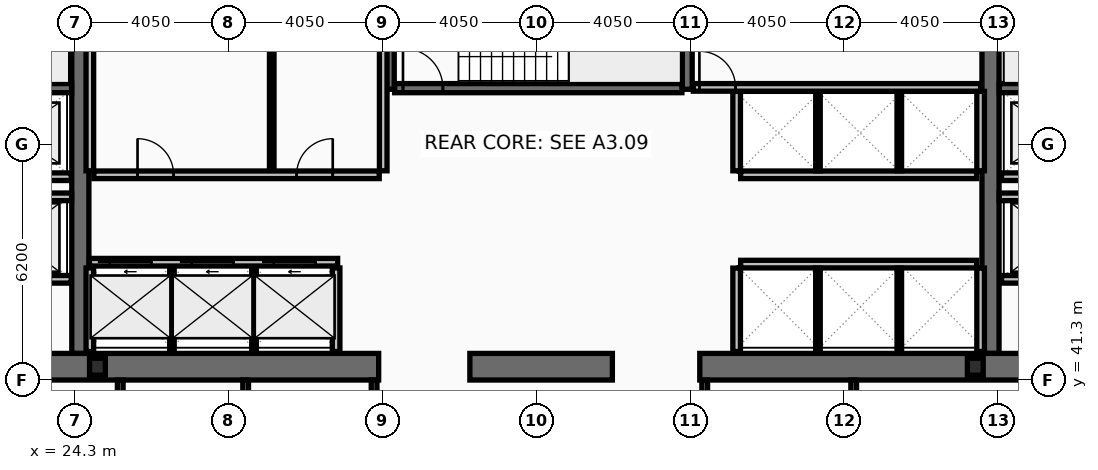
"""IFC4 building model, lengths in metres.
Left out: names, types, materials, properties, quantities, classifications, styles, units other than length and angle.
Written with IfcOpenShell. Run it as: python <this file> out.ifc"""

import sys

from ifc_helpers import new_model, si_unit, direction, frame, frame_2d, origin, origin_2d, place, context, subcontext, project, spatial, rectangle, i_section, extrude, element, fill, save


model = new_model("IFC4")
c1 = context("Model", 3, precision=1e-05, world=origin(), true_north=direction((0.0, 1.0)))
c2 = subcontext(c1, "Body", "Model", "MODEL_VIEW")
j1 = project(units=[si_unit("LENGTHUNIT", "METRE"), si_unit("PLANEANGLEUNIT", "RADIAN")], contexts=[c1])
p1 = place(None, origin())
s1 = spatial("IfcSite", under=j1, at=p1, CompositionType="ELEMENT")
p2 = place(p1, origin())
s2 = spatial("IfcBuilding", under=s1, at=p2, CompositionType="ELEMENT")
p3 = place(p2, frame((0.0, 0.0, 150.6)))
s3 = spatial("IfcBuildingStorey", under=s2, at=p3, CompositionType="ELEMENT", Elevation=150.6)
for number, where, z_axis, x_axis in (
    (1, (24.45, 42.0, 0.0), (0.0, 0.0, 1.0), (0.0, 1.0, 0.0)),
    (2, (48.4, 42.0, 0.0), (0.0, 0.0, 1.0), (0.0, 1.0, 0.0)),
):
    element("IfcWall", number, at=place(p3, frame(where, z_axis=z_axis, x_axis=x_axis)), inside=s3, PredefinedType="SHEAR", context=c2, shape_type="SweptSolid", body=[
        extrude(rectangle(XDim=11.0, YDim=0.45, at=frame_2d((5.5, 0.0))), origin(), (0.0, 0.0, 1.0), 3.44),
    ])
p4 = place(p3, frame((32.3, 41.65, 0.0), z_axis=(0.0, 0.0, 1.0), x_axis=(-1.0, 0.0, 0.0)))
e3 = element("IfcWall", 3, at=p4, inside=s3, PredefinedType="SHEAR", context=c2, shape_type="SweptSolid", body=[
    extrude(rectangle(XDim=11.45, YDim=0.7, at=frame_2d((5.725, 0.0))), origin(), (0.0, 0.0, 1.0), 3.44),
])
p5 = place(p3, frame((38.45, 41.65, 0.0), z_axis=(0.0, 0.0, 1.0), x_axis=(-1.0, 0.0, 0.0)))
e4 = element("IfcWall", 4, at=p5, inside=s3, PredefinedType="SHEAR", context=c2, shape_type="SweptSolid", body=[
    extrude(rectangle(XDim=3.75, YDim=0.7, at=frame_2d((1.875, 0.0))), origin(), (0.0, 0.0, 1.0), 3.44),
])
p6 = place(p3, frame((52.05, 41.65, 0.0), z_axis=(0.0, 0.0, 1.0), x_axis=(-1.0, 0.0, 0.0)))
e5 = element("IfcWall", 5, at=p6, inside=s3, PredefinedType="SHEAR", context=c2, shape_type="SweptSolid", body=[
    extrude(rectangle(XDim=11.3, YDim=0.7, at=frame_2d((5.65, 0.0))), origin(), (0.0, 0.0, 1.0), 3.44),
])
for number, where, z_axis, x_axis in (
    (6, (32.58, 48.95, 0.0), (0.0, 0.0, 1.0), (0.0, 1.0, 0.0)),
    (7, (40.42, 48.95, 0.0), (0.0, 0.0, 1.0), (0.0, 1.0, 0.0)),
):
    element("IfcWall", number, at=place(p3, frame(where, z_axis=z_axis, x_axis=x_axis)), inside=s3, PredefinedType="SHEAR", context=c2, shape_type="SweptSolid", body=[
        extrude(rectangle(XDim=4.05, YDim=0.26, at=frame_2d((2.025, 0.0))), origin(), (0.0, 0.0, 1.0), 3.44),
    ])
p7 = place(p3, frame((16.9, 48.98, 0.0), z_axis=(0.0, 0.0, 1.0), x_axis=(1.0, 0.0, 0.0)))
e8 = element("IfcWall", 8, at=p7, inside=s3, PredefinedType="SHEAR", context=c2, shape_type="SweptSolid", body=[
    extrude(rectangle(XDim=7.32, YDim=0.24, at=frame_2d((3.66, 0.0))), origin(), (0.0, 0.0, 1.0), 3.44),
])
p8 = place(p7, frame((0.22, 0.0, 0.0)))
e9 = element("IfcOpeningElement", 9, at=p8, cuts=e8, PredefinedType="OPENING", context=c2, shape_type="SweptSolid", body=[
    extrude(rectangle(XDim=1.05, YDim=2.15, at=frame_2d((0.525, 1.075))), frame((0.0, 0.13, 0.0), z_axis=(0.0, -1.0, 0.0), x_axis=(1.0, 0.0, 0.0)), (0.0, 0.0, 1.0), 0.26),
])
p9 = place(p3, frame((48.63, 48.98, 0.0), z_axis=(0.0, 0.0, 1.0), x_axis=(1.0, 0.0, 0.0)))
e10 = element("IfcWall", 10, at=p9, inside=s3, PredefinedType="SHEAR", context=c2, shape_type="SweptSolid", body=[
    extrude(rectangle(XDim=7.37, YDim=0.24, at=frame_2d((3.685, 0.0))), origin(), (0.0, 0.0, 1.0), 3.44),
])
p10 = place(p9, frame((6.1, 0.0, 0.0)))
e11 = element("IfcOpeningElement", 11, at=p10, cuts=e10, PredefinedType="OPENING", context=c2, shape_type="SweptSolid", body=[
    extrude(rectangle(XDim=1.05, YDim=2.15, at=frame_2d((0.525, 1.075))), frame((0.0, 0.13, 0.0), z_axis=(0.0, -1.0, 0.0), x_axis=(1.0, 0.0, 0.0)), (0.0, 0.0, 1.0), 0.26),
])
p11 = place(p3, frame((32.72, 48.98, 0.0), z_axis=(0.0, 0.0, 1.0), x_axis=(1.0, 0.0, 0.0)))
e12 = element("IfcWall", 12, at=p11, inside=s3, PredefinedType="SHEAR", context=c2, shape_type="SweptSolid", body=[
    extrude(rectangle(XDim=7.56, YDim=0.24, at=frame_2d((3.78, 0.0))), origin(), (0.0, 0.0, 1.0), 3.44),
])
p12 = place(p11, frame((0.22, 0.0, 0.0)))
e13 = element("IfcOpeningElement", 13, at=p12, cuts=e12, PredefinedType="OPENING", context=c2, shape_type="SweptSolid", body=[
    extrude(rectangle(XDim=1.05, YDim=2.15, at=frame_2d((0.525, 1.075))), frame((0.0, 0.13, 0.0), z_axis=(0.0, -1.0, 0.0), x_axis=(1.0, 0.0, 0.0)), (0.0, 0.0, 1.0), 0.26),
])
for number, where, z_axis, x_axis in (
    (14, (24.9, 41.65, 0.0), (0.0, 0.0, 1.0), (1.0, 0.0, 0.0)),
    (15, (48.0, 41.65, 0.0), (0.0, 0.0, 1.0), (1.0, 0.0, 0.0)),
):
    element("IfcColumn", number, at=place(p3, frame(where, z_axis=z_axis, x_axis=x_axis)), inside=s3, PredefinedType="COLUMN", context=c2, shape_type="SweptSolid", body=[
        extrude(i_section(OverallWidth=0.416, OverallDepth=0.446, WebThickness=0.039, FlangeThickness=0.063, at=origin_2d()), origin(), (0.0, 0.0, 1.0), 3.6),
    ])
p13 = place(p3, frame((24.69, 44.4, 0.0), z_axis=(0.0, 0.0, 1.0), x_axis=(1.0, 0.0, 0.0)))
e16 = element("IfcWall", 16, at=p13, inside=s3, PredefinedType="PARTITIONING", context=c2, shape_type="SweptSolid", body=[
    extrude(rectangle(XDim=6.53, YDim=0.2, at=frame_2d((3.265, 0.0))), origin(), (0.0, 0.0, 1.0), 3.44),
])
p14 = place(p13, frame((0.53, 0.0, 0.0)))
e17 = element("IfcOpeningElement", 17, at=p14, cuts=e16, PredefinedType="OPENING", context=c2, shape_type="SweptSolid", body=[
    extrude(rectangle(XDim=1.1, YDim=2.18, at=frame_2d((0.55, 1.09))), frame((0.0, 0.11, 0.0), z_axis=(0.0, -1.0, 0.0), x_axis=(1.0, 0.0, 0.0)), (0.0, 0.0, 1.0), 0.22),
])
p15 = place(p13, frame((2.69, 0.0, 0.0)))
e18 = element("IfcOpeningElement", 18, at=p15, cuts=e16, PredefinedType="OPENING", context=c2, shape_type="SweptSolid", body=[
    extrude(rectangle(XDim=1.1, YDim=2.18, at=frame_2d((0.55, 1.09))), frame((0.0, 0.11, 0.0), z_axis=(0.0, -1.0, 0.0), x_axis=(1.0, 0.0, 0.0)), (0.0, 0.0, 1.0), 0.22),
])
p16 = place(p13, frame((4.85, 0.0, 0.0)))
e19 = element("IfcOpeningElement", 19, at=p16, cuts=e16, PredefinedType="OPENING", context=c2, shape_type="SweptSolid", body=[
    extrude(rectangle(XDim=1.1, YDim=2.18, at=frame_2d((0.55, 1.09))), frame((0.0, 0.11, 0.0), z_axis=(0.0, -1.0, 0.0), x_axis=(1.0, 0.0, 0.0)), (0.0, 0.0, 1.0), 0.22),
])
p17 = place(p3, frame((51.61, 43.95, 0.0), z_axis=(0.0, 0.0, 1.0), x_axis=(-1.0, 0.0, 0.0)))
e20 = element("IfcWall", 20, at=p17, inside=s3, PredefinedType="PARTITIONING", context=c2, shape_type="SweptSolid", body=[
    extrude(rectangle(XDim=2.92, YDim=0.2, at=frame_2d((1.46, 0.0))), origin(), (0.0, 0.0, 1.0), 3.44),
])
p18 = place(p17, frame((0.81, 0.0, 0.0)))
e21 = element("IfcOpeningElement", 21, at=p18, cuts=e20, PredefinedType="OPENING", context=c2, shape_type="SweptSolid", body=[
    extrude(rectangle(XDim=1.3, YDim=2.18, at=frame_2d((0.65, 1.09))), frame((0.0, 0.11, 0.0), z_axis=(0.0, -1.0, 0.0), x_axis=(1.0, 0.0, 0.0)), (0.0, 0.0, 1.0), 0.22),
])
p19 = place(p3, frame((24.21, 43.95, 0.0), z_axis=(0.0, 0.0, 1.0), x_axis=(-1.0, 0.0, 0.0)))
e22 = element("IfcWall", 22, at=p19, inside=s3, PredefinedType="PARTITIONING", context=c2, shape_type="SweptSolid", body=[
    extrude(rectangle(XDim=2.97, YDim=0.2, at=frame_2d((1.485, 0.0))), origin(), (0.0, 0.0, 1.0), 3.44),
])
p20 = place(p19, frame((0.86, 0.0, 0.0)))
e23 = element("IfcOpeningElement", 23, at=p20, cuts=e22, PredefinedType="OPENING", context=c2, shape_type="SweptSolid", body=[
    extrude(rectangle(XDim=1.3, YDim=2.18, at=frame_2d((0.65, 1.09))), frame((0.0, 0.11, 0.0), z_axis=(0.0, -1.0, 0.0), x_axis=(1.0, 0.0, 0.0)), (0.0, 0.0, 1.0), 0.22),
])
p21 = place(p3, frame((51.61, 46.65, 0.0), z_axis=(0.0, 0.0, 1.0), x_axis=(-1.0, 0.0, 0.0)))
e24 = element("IfcWall", 24, at=p21, inside=s3, PredefinedType="PARTITIONING", context=c2, shape_type="SweptSolid", body=[
    extrude(rectangle(XDim=2.92, YDim=0.2, at=frame_2d((1.46, 0.0))), origin(), (0.0, 0.0, 1.0), 3.44),
])
p22 = place(p21, frame((0.86, 0.0, 0.0)))
e25 = element("IfcOpeningElement", 25, at=p22, cuts=e24, PredefinedType="OPENING", context=c2, shape_type="SweptSolid", body=[
    extrude(rectangle(XDim=1.2, YDim=2.18, at=frame_2d((0.6, 1.09))), frame((0.0, 0.11, 0.0), z_axis=(0.0, -1.0, 0.0), x_axis=(1.0, 0.0, 0.0)), (0.0, 0.0, 1.0), 0.22),
])
p23 = place(p3, frame((24.21, 46.65, 0.0), z_axis=(0.0, 0.0, 1.0), x_axis=(-1.0, 0.0, 0.0)))
e26 = element("IfcWall", 26, at=p23, inside=s3, PredefinedType="PARTITIONING", context=c2, shape_type="SweptSolid", body=[
    extrude(rectangle(XDim=2.97, YDim=0.2, at=frame_2d((1.485, 0.0))), origin(), (0.0, 0.0, 1.0), 3.44),
])
p24 = place(p23, frame((0.91, 0.0, 0.0)))
e27 = element("IfcOpeningElement", 27, at=p24, cuts=e26, PredefinedType="OPENING", context=c2, shape_type="SweptSolid", body=[
    extrude(rectangle(XDim=1.2, YDim=2.18, at=frame_2d((0.6, 1.09))), frame((0.0, 0.11, 0.0), z_axis=(0.0, -1.0, 0.0), x_axis=(1.0, 0.0, 0.0)), (0.0, 0.0, 1.0), 0.22),
])
p25 = place(p3, frame((21.2, 46.12, 0.0), z_axis=(0.0, 0.0, 1.0), x_axis=(1.0, 0.0, 0.0)))
e28 = element("IfcWall", 28, at=p25, inside=s3, PredefinedType="PARTITIONING", context=c2, shape_type="SweptSolid", body=[
    extrude(rectangle(XDim=3.02, YDim=0.2, at=frame_2d((1.51, 0.0))), origin(), (0.0, 0.0, 1.0), 3.44),
])
p26 = place(p3, frame((48.63, 46.12, 0.0), z_axis=(0.0, 0.0, 1.0), x_axis=(1.0, 0.0, 0.0)))
e29 = element("IfcWall", 29, at=p26, inside=s3, PredefinedType="PARTITIONING", context=c2, shape_type="SweptSolid", body=[
    extrude(rectangle(XDim=3.07, YDim=0.2, at=frame_2d((1.535, 0.0))), origin(), (0.0, 0.0, 1.0), 3.44),
])
for number, where, z_axis, x_axis in (
    (30, (24.7, 46.805, 0.0), (0.0, 0.0, 1.0), (0.0, 1.0, 0.0)),
    (31, (32.42, 46.805, 0.0), (0.0, 0.0, 1.0), (0.0, 1.0, 0.0)),
):
    element("IfcWall", number, at=place(p3, frame(where, z_axis=z_axis, x_axis=x_axis)), inside=s3, PredefinedType="PARTITIONING", context=c2, shape_type="SweptSolid", body=[
        extrude(rectangle(XDim=5.99, YDim=0.2, at=frame_2d((2.995, 0.0))), origin(), (0.0, 0.0, 1.0), 3.44),
    ])
p27 = place(p3, frame((29.486, 46.805, 0.0), z_axis=(0.0, 0.0, 1.0), x_axis=(0.0, 1.0, 0.0)))
e32 = element("IfcWall", 32, at=p27, inside=s3, PredefinedType="PARTITIONING", context=c2, shape_type="SweptSolid", body=[
    extrude(rectangle(XDim=5.99, YDim=0.12, at=frame_2d((2.995, 0.0))), origin(), (0.0, 0.0, 1.0), 3.44),
])
p28 = place(p3, frame((24.805, 46.7, 0.0), z_axis=(0.0, 0.0, 1.0), x_axis=(1.0, 0.0, 0.0)))
e33 = element("IfcWall", 33, at=p28, inside=s3, PredefinedType="PARTITIONING", context=c2, shape_type="SweptSolid", body=[
    extrude(rectangle(XDim=7.51, YDim=0.2, at=frame_2d((3.755, 0.0))), origin(), (0.0, 0.0, 1.0), 3.44),
])
p29 = place(p28, frame((1.15, 0.0, 0.0)))
e34 = element("IfcOpeningElement", 34, at=p29, cuts=e33, PredefinedType="OPENING", context=c2, shape_type="SweptSolid", body=[
    extrude(rectangle(XDim=0.95, YDim=2.1, at=frame_2d((0.475, 1.05))), frame((0.0, 0.11, 0.0), z_axis=(0.0, -1.0, 0.0), x_axis=(1.0, 0.0, 0.0)), (0.0, 0.0, 1.0), 0.22),
])
p30 = place(p28, frame((5.336, 0.0, 0.0)))
e35 = element("IfcOpeningElement", 35, at=p30, cuts=e33, PredefinedType="OPENING", context=c2, shape_type="SweptSolid", body=[
    extrude(rectangle(XDim=0.95, YDim=2.1, at=frame_2d((0.475, 1.05))), frame((0.0, 0.11, 0.0), z_axis=(0.0, -1.0, 0.0), x_axis=(1.0, 0.0, 0.0)), (0.0, 0.0, 1.0), 0.22),
])
for number, where, z_axis, x_axis in (
    (36, (24.7, 42.05, 0.0), (0.0, 0.0, 1.0), (0.0, 1.0, 0.0)),
    (37, (31.18, 42.05, 0.0), (0.0, 0.0, 1.0), (0.0, 1.0, 0.0)),
):
    element("IfcWall", number, at=place(p3, frame(where, z_axis=z_axis, x_axis=x_axis)), inside=s3, PredefinedType="PARTITIONING", context=c2, shape_type="SweptSolid", body=[
        extrude(rectangle(XDim=2.2, YDim=0.2, at=frame_2d((1.1, 0.0))), origin(), (0.0, 0.0, 1.0), 3.44),
    ])
for number, where, z_axis, x_axis in (
    (38, (26.86, 42.05, 0.0), (0.0, 0.0, 1.0), (0.0, 1.0, 0.0)),
    (39, (29.02, 42.05, 0.0), (0.0, 0.0, 1.0), (0.0, 1.0, 0.0)),
):
    element("IfcWall", number, at=place(p3, frame(where, z_axis=z_axis, x_axis=x_axis)), inside=s3, PredefinedType="PARTITIONING", context=c2, shape_type="SweptSolid", body=[
        extrude(rectangle(XDim=2.2, YDim=0.12, at=frame_2d((1.1, 0.0))), origin(), (0.0, 0.0, 1.0), 3.44),
    ])
p31 = place(p3, frame((41.825, 46.7, 0.0), z_axis=(0.0, 0.0, 1.0), x_axis=(1.0, 0.0, 0.0)))
e40 = element("IfcWall", 40, at=p31, inside=s3, PredefinedType="PARTITIONING", context=c2, shape_type="SweptSolid", body=[
    extrude(rectangle(XDim=6.21, YDim=0.2, at=frame_2d((3.105, 0.0))), origin(), (0.0, 0.0, 1.0), 3.44),
])
for number, where, z_axis, x_axis in (
    (41, (41.72, 46.805, 0.0), (0.0, 0.0, 1.0), (0.0, 1.0, 0.0)),
    (42, (48.14, 46.805, 0.0), (0.0, 0.0, 1.0), (0.0, 1.0, 0.0)),
):
    element("IfcWall", number, at=place(p3, frame(where, z_axis=z_axis, x_axis=x_axis)), inside=s3, PredefinedType="PARTITIONING", context=c2, shape_type="SweptSolid", body=[
        extrude(rectangle(XDim=2.09, YDim=0.2, at=frame_2d((1.045, 0.0))), origin(), (0.0, 0.0, 1.0), 3.44),
    ])
for number, where, z_axis, x_axis in (
    (43, (43.86, 46.805, 0.0), (0.0, 0.0, 1.0), (0.0, 1.0, 0.0)),
    (44, (46.0, 46.805, 0.0), (0.0, 0.0, 1.0), (0.0, 1.0, 0.0)),
):
    element("IfcWall", number, at=place(p3, frame(where, z_axis=z_axis, x_axis=x_axis)), inside=s3, PredefinedType="PARTITIONING", context=c2, shape_type="SweptSolid", body=[
        extrude(rectangle(XDim=2.09, YDim=0.12, at=frame_2d((1.045, 0.0))), origin(), (0.0, 0.0, 1.0), 3.44),
    ])
p32 = place(p3, frame((41.825, 44.35, 0.0), z_axis=(0.0, 0.0, 1.0), x_axis=(1.0, 0.0, 0.0)))
e45 = element("IfcWall", 45, at=p32, inside=s3, PredefinedType="PARTITIONING", context=c2, shape_type="SweptSolid", body=[
    extrude(rectangle(XDim=6.21, YDim=0.2, at=frame_2d((3.105, 0.0))), origin(), (0.0, 0.0, 1.0), 3.44),
])
for number, where, z_axis, x_axis in (
    (46, (41.72, 42.05, 0.0), (0.0, 0.0, 1.0), (0.0, 1.0, 0.0)),
    (47, (48.14, 42.05, 0.0), (0.0, 0.0, 1.0), (0.0, 1.0, 0.0)),
):
    element("IfcWall", number, at=place(p3, frame(where, z_axis=z_axis, x_axis=x_axis)), inside=s3, PredefinedType="PARTITIONING", context=c2, shape_type="SweptSolid", body=[
        extrude(rectangle(XDim=2.195, YDim=0.2, at=frame_2d((1.098, 0.0))), origin(), (0.0, 0.0, 1.0), 3.44),
    ])
for number, where, z_axis, x_axis in (
    (48, (43.86, 42.05, 0.0), (0.0, 0.0, 1.0), (0.0, 1.0, 0.0)),
    (49, (46.0, 42.05, 0.0), (0.0, 0.0, 1.0), (0.0, 1.0, 0.0)),
):
    element("IfcWall", number, at=place(p3, frame(where, z_axis=z_axis, x_axis=x_axis)), inside=s3, PredefinedType="PARTITIONING", context=c2, shape_type="SweptSolid", body=[
        extrude(rectangle(XDim=2.195, YDim=0.12, at=frame_2d((1.098, 0.0))), origin(), (0.0, 0.0, 1.0), 3.44),
    ])
p33 = place(p3, frame((40.58, 49.0, 0.0), z_axis=(0.0, 0.0, 1.0), x_axis=(1.0, 0.0, 0.0)))
e50 = element("IfcWall", 50, at=p33, inside=s3, PredefinedType="PARTITIONING", context=c2, shape_type="SweptSolid", body=[
    extrude(rectangle(XDim=7.56, YDim=0.2, at=frame_2d((3.78, 0.0))), origin(), (0.0, 0.0, 1.0), 3.44),
])
p34 = place(p33, frame((0.16, 0.0, 0.0)))
e51 = element("IfcOpeningElement", 51, at=p34, cuts=e50, PredefinedType="OPENING", context=c2, shape_type="SweptSolid", body=[
    extrude(rectangle(XDim=0.95, YDim=2.1, at=frame_2d((0.475, 1.05))), frame((0.0, 0.11, 0.0), z_axis=(0.0, -1.0, 0.0), x_axis=(1.0, 0.0, 0.0)), (0.0, 0.0, 1.0), 0.22),
])
for number, where, z_axis, x_axis in (
    (52, (25.5, 38.28, 0.0), (0.0, 0.0, 1.0), (0.0, 1.0, 0.0)),
    (53, (28.8, 38.28, 0.0), (0.0, 0.0, 1.0), (0.0, 1.0, 0.0)),
    (54, (32.18, 38.28, 0.0), (0.0, 0.0, 1.0), (0.0, 1.0, 0.0)),
    (55, (40.88, 38.28, 0.0), (0.0, 0.0, 1.0), (0.0, 1.0, 0.0)),
    (56, (44.8, 38.28, 0.0), (0.0, 0.0, 1.0), (0.0, 1.0, 0.0)),
):
    element("IfcWall", number, at=place(p3, frame(where, z_axis=z_axis, x_axis=x_axis)), inside=s3, PredefinedType="PARTITIONING", context=c2, shape_type="SweptSolid", body=[
        extrude(rectangle(XDim=3.02, YDim=0.15, at=frame_2d((1.51, 0.0))), origin(), (0.0, 0.0, 1.0), 3.44),
    ])
p35 = place(p12, origin())
e57 = element("IfcDoor", 57, at=p35, inside=s3, OperationType="SINGLE_SWING_LEFT", PredefinedType="DOOR", context=c2, shape_type="SweptSolid", body=[
    extrude(rectangle(XDim=1.05, YDim=2.15, at=frame_2d((0.525, 1.075))), frame((0.0, 0.025, 0.0), z_axis=(0.0, -1.0, 0.0), x_axis=(1.0, 0.0, 0.0)), (0.0, 0.0, 1.0), 0.05),
])
fill(e13, e57)
p36 = place(p14, origin())
e58 = element("IfcDoor", 58, at=p36, inside=s3, OperationType="SLIDING_TO_LEFT", PredefinedType="DOOR", context=c2, shape_type="SweptSolid", body=[
    extrude(rectangle(XDim=1.1, YDim=2.18, at=frame_2d((0.55, 1.09))), frame((0.0, 0.025, 0.0), z_axis=(0.0, -1.0, 0.0), x_axis=(1.0, 0.0, 0.0)), (0.0, 0.0, 1.0), 0.05),
])
fill(e17, e58)
p37 = place(p15, origin())
e59 = element("IfcDoor", 59, at=p37, inside=s3, OperationType="SLIDING_TO_LEFT", PredefinedType="DOOR", context=c2, shape_type="SweptSolid", body=[
    extrude(rectangle(XDim=1.1, YDim=2.18, at=frame_2d((0.55, 1.09))), frame((0.0, 0.025, 0.0), z_axis=(0.0, -1.0, 0.0), x_axis=(1.0, 0.0, 0.0)), (0.0, 0.0, 1.0), 0.05),
])
fill(e18, e59)
p38 = place(p16, origin())
e60 = element("IfcDoor", 60, at=p38, inside=s3, OperationType="SLIDING_TO_LEFT", PredefinedType="DOOR", context=c2, shape_type="SweptSolid", body=[
    extrude(rectangle(XDim=1.1, YDim=2.18, at=frame_2d((0.55, 1.09))), frame((0.0, 0.025, 0.0), z_axis=(0.0, -1.0, 0.0), x_axis=(1.0, 0.0, 0.0)), (0.0, 0.0, 1.0), 0.05),
])
fill(e19, e60)
p39 = place(p29, origin())
e61 = element("IfcDoor", 61, at=p39, inside=s3, OperationType="SINGLE_SWING_LEFT", PredefinedType="DOOR", context=c2, shape_type="SweptSolid", body=[
    extrude(rectangle(XDim=0.95, YDim=2.1, at=frame_2d((0.475, 1.05))), frame((0.0, 0.025, 0.0), z_axis=(0.0, -1.0, 0.0), x_axis=(1.0, 0.0, 0.0)), (0.0, 0.0, 1.0), 0.05),
])
fill(e34, e61)
p40 = place(p30, origin())
e62 = element("IfcDoor", 62, at=p40, inside=s3, OperationType="SINGLE_SWING_RIGHT", PredefinedType="DOOR", context=c2, shape_type="SweptSolid", body=[
    extrude(rectangle(XDim=0.95, YDim=2.1, at=frame_2d((0.475, 1.05))), frame((0.0, 0.025, 0.0), z_axis=(0.0, -1.0, 0.0), x_axis=(1.0, 0.0, 0.0)), (0.0, 0.0, 1.0), 0.05),
])
fill(e35, e62)
p41 = place(p34, origin())
e63 = element("IfcDoor", 63, at=p41, inside=s3, OperationType="SINGLE_SWING_LEFT", PredefinedType="DOOR", context=c2, shape_type="SweptSolid", body=[
    extrude(rectangle(XDim=0.95, YDim=2.1, at=frame_2d((0.475, 1.05))), frame((0.0, 0.025, 0.0), z_axis=(0.0, -1.0, 0.0), x_axis=(1.0, 0.0, 0.0)), (0.0, 0.0, 1.0), 0.05),
])
fill(e51, e63)
save(model, sys.argv[1])
